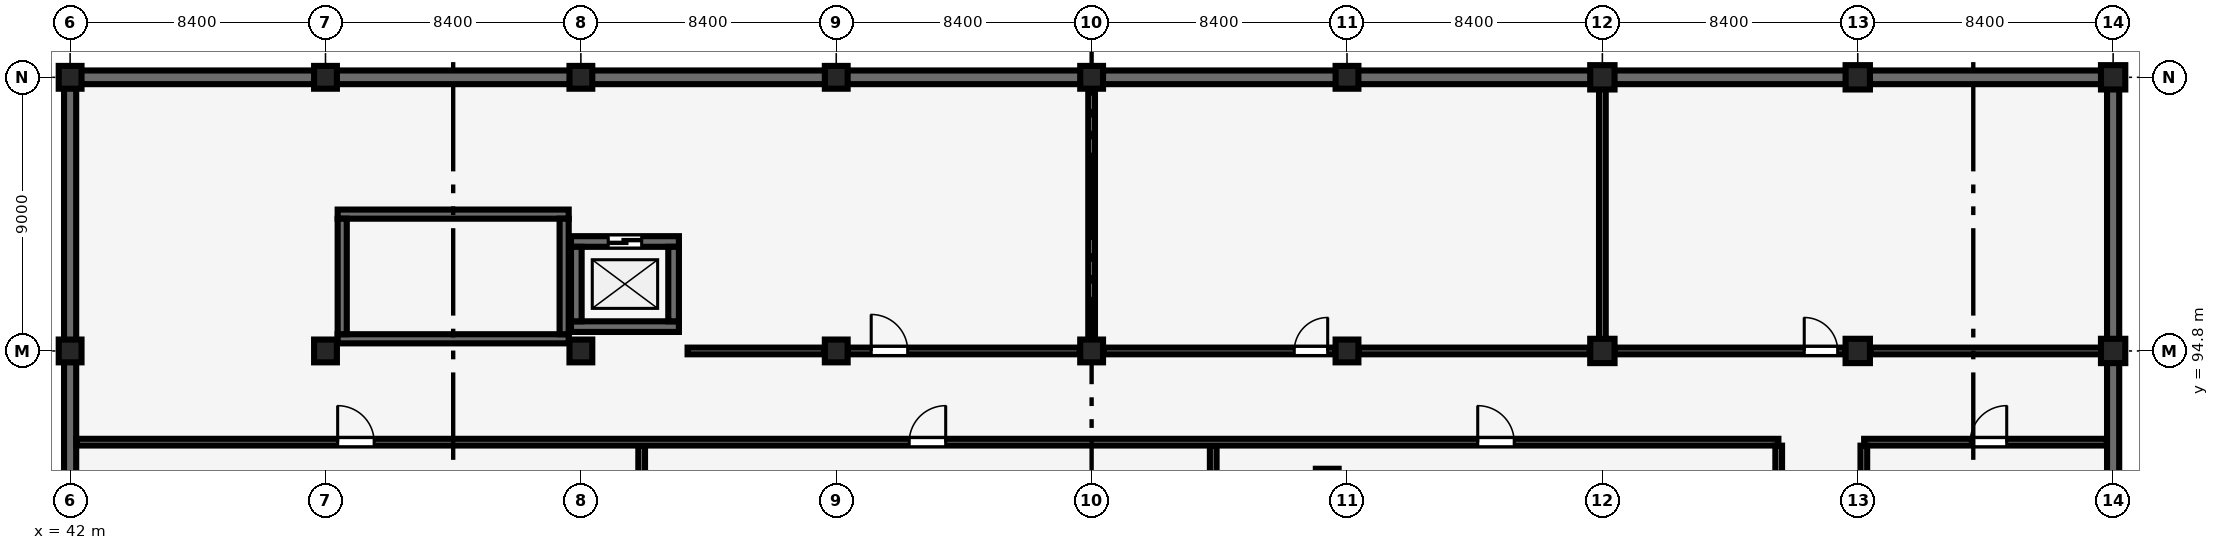
"""IFC4 building model, lengths in metres.
Left out: names, types, materials, properties, quantities, classifications, styles, units other than length and angle.
Written with IfcOpenShell. Run it as: python <this file> out.ifc"""

import sys

from ifc_helpers import new_model, si_unit, direction, frame, frame_2d, origin, origin_2d, place, context, subcontext, project, spatial, rectangle, extrude, element, fill, save


model = new_model("IFC4")
c1 = context("Model", 3, precision=1e-05, world=origin(), true_north=direction((0.0, 1.0)))
c2 = subcontext(c1, "Body", "Model", "MODEL_VIEW")
j1 = project(units=[si_unit("LENGTHUNIT", "METRE"), si_unit("PLANEANGLEUNIT", "RADIAN")], contexts=[c1])
p1 = place(None, origin())
s1 = spatial("IfcSite", under=j1, at=p1, CompositionType="ELEMENT")
p2 = place(p1, origin())
s2 = spatial("IfcBuilding", under=s1, at=p2, CompositionType="ELEMENT")
p3 = place(p2, frame((0.0, 0.0, -4.2)))
s3 = spatial("IfcBuildingStorey", under=s2, at=p3, CompositionType="ELEMENT", Elevation=-4.2)
for number, where, z_axis, x_axis in (
    (1, (42.0, 94.8, 0.0), (0.0, 0.0, 1.0), (1.0, 0.0, 0.0)),
    (2, (42.0, 103.8, 0.0), (0.0, 0.0, 1.0), (1.0, 0.0, 0.0)),
    (3, (50.4, 94.8, 0.0), (0.0, 0.0, 1.0), (1.0, 0.0, 0.0)),
    (4, (50.4, 103.8, 0.0), (0.0, 0.0, 1.0), (1.0, 0.0, 0.0)),
    (5, (58.8, 94.8, 0.0), (0.0, 0.0, 1.0), (1.0, 0.0, 0.0)),
    (6, (58.8, 103.8, 0.0), (0.0, 0.0, 1.0), (1.0, 0.0, 0.0)),
    (7, (67.2, 94.8, 0.0), (0.0, 0.0, 1.0), (1.0, 0.0, 0.0)),
    (8, (67.2, 103.8, 0.0), (0.0, 0.0, 1.0), (1.0, 0.0, 0.0)),
    (9, (75.6, 94.8, 0.0), (0.0, 0.0, 1.0), (1.0, 0.0, 0.0)),
    (10, (75.6, 103.8, 0.0), (0.0, 0.0, 1.0), (1.0, 0.0, 0.0)),
    (11, (84.0, 94.8, 0.0), (0.0, 0.0, 1.0), (1.0, 0.0, 0.0)),
    (12, (84.0, 103.8, 0.0), (0.0, 0.0, 1.0), (1.0, 0.0, 0.0)),
):
    element("IfcColumn", number, at=place(p3, frame(where, z_axis=z_axis, x_axis=x_axis)), inside=s3, PredefinedType="COLUMN", context=c2, shape_type="SweptSolid", body=[
        extrude(rectangle(XDim=0.75, YDim=0.75, at=origin_2d()), origin(), (0.0, 0.0, 1.0), 4.2),
    ])
for number, where, z_axis, x_axis in (
    (13, (92.4, 94.8, 0.0), (0.0, 0.0, 1.0), (1.0, 0.0, 0.0)),
    (14, (92.4, 103.8, 0.0), (0.0, 0.0, 1.0), (1.0, 0.0, 0.0)),
    (15, (100.8, 94.8, 0.0), (0.0, 0.0, 1.0), (1.0, 0.0, 0.0)),
    (16, (100.8, 103.8, 0.0), (0.0, 0.0, 1.0), (1.0, 0.0, 0.0)),
    (17, (109.2, 94.8, 0.0), (0.0, 0.0, 1.0), (1.0, 0.0, 0.0)),
    (18, (109.2, 103.8, 0.0), (0.0, 0.0, 1.0), (1.0, 0.0, 0.0)),
):
    element("IfcColumn", number, at=place(p3, frame(where, z_axis=z_axis, x_axis=x_axis)), inside=s3, PredefinedType="COLUMN", context=c2, shape_type="SweptSolid", body=[
        extrude(rectangle(XDim=0.8, YDim=0.8, at=origin_2d()), origin(), (0.0, 0.0, 1.0), 4.2),
    ])
p4 = place(p3, frame((109.2, 86.175, 0.0), z_axis=(0.0, 0.0, 1.0), x_axis=(0.0, 1.0, 0.0)))
e19 = element("IfcWall", 19, at=p4, inside=s3, PredefinedType="SHEAR", context=c2, shape_type="SweptSolid", body=[
    extrude(rectangle(XDim=8.25, YDim=0.4, at=frame_2d((4.125, 0.0))), origin(), (0.0, 0.0, 1.0), 2.9),
])
p5 = place(p3, frame((109.2, 95.175, 0.0), z_axis=(0.0, 0.0, 1.0), x_axis=(0.0, 1.0, 0.0)))
e20 = element("IfcWall", 20, at=p5, inside=s3, PredefinedType="SHEAR", context=c2, shape_type="SweptSolid", body=[
    extrude(rectangle(XDim=8.25, YDim=0.4, at=frame_2d((4.125, 0.0))), origin(), (0.0, 0.0, 1.0), 2.85),
])
p6 = place(p3, frame((42.35, 103.8, 0.0), z_axis=(0.0, 0.0, 1.0), x_axis=(1.0, 0.0, 0.0)))
e21 = element("IfcWall", 21, at=p6, inside=s3, PredefinedType="SHEAR", context=c2, shape_type="SweptSolid", body=[
    extrude(rectangle(XDim=7.7, YDim=0.45, at=frame_2d((3.85, 0.0))), origin(), (0.0, 0.0, 1.0), 3.2),
])
p7 = place(p3, frame((50.75, 103.8, 0.0), z_axis=(0.0, 0.0, 1.0), x_axis=(1.0, 0.0, 0.0)))
e22 = element("IfcWall", 22, at=p7, inside=s3, PredefinedType="SHEAR", context=c2, shape_type="SweptSolid", body=[
    extrude(rectangle(XDim=7.7, YDim=0.45, at=frame_2d((3.85, 0.0))), origin(), (0.0, 0.0, 1.0), 3.15),
])
p8 = place(p3, frame((59.15, 103.8, 0.0), z_axis=(0.0, 0.0, 1.0), x_axis=(1.0, 0.0, 0.0)))
e23 = element("IfcWall", 23, at=p8, inside=s3, PredefinedType="SHEAR", context=c2, shape_type="SweptSolid", body=[
    extrude(rectangle(XDim=7.7, YDim=0.45, at=frame_2d((3.85, 0.0))), origin(), (0.0, 0.0, 1.0), 3.2),
])
p9 = place(p3, frame((67.55, 103.8, 0.0), z_axis=(0.0, 0.0, 1.0), x_axis=(1.0, 0.0, 0.0)))
e24 = element("IfcWall", 24, at=p9, inside=s3, PredefinedType="SHEAR", context=c2, shape_type="SweptSolid", body=[
    extrude(rectangle(XDim=7.7, YDim=0.45, at=frame_2d((3.85, 0.0))), origin(), (0.0, 0.0, 1.0), 3.15),
])
p10 = place(p3, frame((75.95, 103.8, 0.0), z_axis=(0.0, 0.0, 1.0), x_axis=(1.0, 0.0, 0.0)))
e25 = element("IfcWall", 25, at=p10, inside=s3, PredefinedType="SHEAR", context=c2, shape_type="SweptSolid", body=[
    extrude(rectangle(XDim=7.7, YDim=0.45, at=frame_2d((3.85, 0.0))), origin(), (0.0, 0.0, 1.0), 3.1),
])
p11 = place(p3, frame((84.35, 103.8, 0.0), z_axis=(0.0, 0.0, 1.0), x_axis=(1.0, 0.0, 0.0)))
e26 = element("IfcWall", 26, at=p11, inside=s3, PredefinedType="SHEAR", context=c2, shape_type="SweptSolid", body=[
    extrude(rectangle(XDim=7.675, YDim=0.45, at=frame_2d((3.837, 0.0))), origin(), (0.0, 0.0, 1.0), 3.05),
])
p12 = place(p3, frame((92.775, 103.8, 0.0), z_axis=(0.0, 0.0, 1.0), x_axis=(1.0, 0.0, 0.0)))
e27 = element("IfcWall", 27, at=p12, inside=s3, PredefinedType="SHEAR", context=c2, shape_type="SweptSolid", body=[
    extrude(rectangle(XDim=7.65, YDim=0.45, at=frame_2d((3.825, 0.0))), origin(), (0.0, 0.0, 1.0), 3.1),
])
p13 = place(p3, frame((101.175, 103.8, 0.0), z_axis=(0.0, 0.0, 1.0), x_axis=(1.0, 0.0, 0.0)))
e28 = element("IfcWall", 28, at=p13, inside=s3, PredefinedType="SHEAR", context=c2, shape_type="SweptSolid", body=[
    extrude(rectangle(XDim=7.65, YDim=0.45, at=frame_2d((3.825, 0.0))), origin(), (0.0, 0.0, 1.0), 3.05),
])
p14 = place(p3, frame((42.0, 86.15, 0.0), z_axis=(0.0, 0.0, 1.0), x_axis=(0.0, 1.0, 0.0)))
e29 = element("IfcWall", 29, at=p14, inside=s3, PredefinedType="SHEAR", context=c2, shape_type="SweptSolid", body=[
    extrude(rectangle(XDim=8.3, YDim=0.4, at=frame_2d((4.15, 0.0))), origin(), (0.0, 0.0, 1.0), 3.0),
])
p15 = place(p3, frame((42.0, 95.15, 0.0), z_axis=(0.0, 0.0, 1.0), x_axis=(0.0, 1.0, 0.0)))
e30 = element("IfcWall", 30, at=p15, inside=s3, PredefinedType="SHEAR", context=c2, shape_type="SweptSolid", body=[
    extrude(rectangle(XDim=8.3, YDim=0.4, at=frame_2d((4.15, 0.0))), origin(), (0.0, 0.0, 1.0), 2.95),
])
for number, where, z_axis, x_axis in (
    (31, (50.8, 95.2, 0.0), (0.0, 0.0, 1.0), (1.0, 0.0, 0.0)),
    (32, (50.8, 99.3, 0.0), (0.0, 0.0, 1.0), (1.0, 0.0, 0.0)),
):
    element("IfcWall", number, at=place(p3, frame(where, z_axis=z_axis, x_axis=x_axis)), inside=s3, PredefinedType="SHEAR", context=c2, shape_type="SweptSolid", body=[
        extrude(rectangle(XDim=7.6, YDim=0.3, at=frame_2d((3.8, 0.0))), origin(), (0.0, 0.0, 1.0), 4.025),
    ])
for number, where, z_axis, x_axis in (
    (33, (50.95, 95.35, 0.0), (0.0, 0.0, 1.0), (0.0, 1.0, 0.0)),
    (34, (58.25, 95.35, 0.0), (0.0, 0.0, 1.0), (0.0, 1.0, 0.0)),
):
    element("IfcWall", number, at=place(p3, frame(where, z_axis=z_axis, x_axis=x_axis)), inside=s3, PredefinedType="SHEAR", context=c2, shape_type="SweptSolid", body=[
        extrude(rectangle(XDim=3.8, YDim=0.3, at=frame_2d((1.9, 0.0))), origin(), (0.0, 0.0, 1.0), 4.025),
    ])
p16 = place(p3, frame((58.475, 95.6, 0.0), z_axis=(0.0, 0.0, 1.0), x_axis=(1.0, 0.0, 0.0)))
e35 = element("IfcWall", 35, at=p16, inside=s3, PredefinedType="SHEAR", context=c2, shape_type="SweptSolid", body=[
    extrude(rectangle(XDim=3.55, YDim=0.35, at=frame_2d((1.775, 0.0))), origin(), (0.0, 0.0, 1.0), 3.92),
])
p17 = place(p3, frame((58.475, 98.4, 0.0), z_axis=(0.0, 0.0, 1.0), x_axis=(1.0, 0.0, 0.0)))
e36 = element("IfcWall", 36, at=p17, inside=s3, PredefinedType="SHEAR", context=c2, shape_type="SweptSolid", body=[
    extrude(rectangle(XDim=3.55, YDim=0.35, at=frame_2d((1.775, 0.0))), origin(), (0.0, 0.0, 1.0), 3.92),
])
p18 = place(p17, frame((1.225, 0.0, 0.0)))
e37 = element("IfcOpeningElement", 37, at=p18, cuts=e36, PredefinedType="OPENING", context=c2, shape_type="SweptSolid", body=[
    extrude(rectangle(XDim=1.1, YDim=2.2, at=frame_2d((0.55, 1.1))), frame((0.0, 0.185, 0.0), z_axis=(0.0, -1.0, 0.0), x_axis=(1.0, 0.0, 0.0)), (0.0, 0.0, 1.0), 0.37),
])
for number, where, z_axis, x_axis in (
    (38, (58.65, 95.775, 0.0), (0.0, 0.0, 1.0), (0.0, 1.0, 0.0)),
    (39, (61.85, 95.775, 0.0), (0.0, 0.0, 1.0), (0.0, 1.0, 0.0)),
):
    element("IfcWall", number, at=place(p3, frame(where, z_axis=z_axis, x_axis=x_axis)), inside=s3, PredefinedType="SHEAR", context=c2, shape_type="SweptSolid", body=[
        extrude(rectangle(XDim=2.45, YDim=0.35, at=frame_2d((1.225, 0.0))), origin(), (0.0, 0.0, 1.0), 3.92),
    ])
p19 = place(p3, frame((83.35, 90.55, 0.0), z_axis=(0.0, 0.0, 1.0), x_axis=(1.0, 0.0, 0.0)))
e40 = element("IfcColumn", 40, at=p19, inside=s3, PredefinedType="COLUMN", context=c2, shape_type="SweptSolid", body=[
    extrude(rectangle(XDim=0.75, YDim=0.75, at=origin_2d()), origin(), (0.0, 0.0, 1.0), 4.2),
])
for number, where, z_axis, x_axis in (
    (41, (60.8, 86.03, 0.0), (0.0, 0.0, 1.0), (0.0, 1.0, 0.0)),
    (42, (79.6, 86.03, 0.0), (0.0, 0.0, 1.0), (0.0, 1.0, 0.0)),
):
    element("IfcWall", number, at=place(p3, frame(where, z_axis=z_axis, x_axis=x_axis)), inside=s3, PredefinedType="SOLIDWALL", context=c2, shape_type="SweptSolid", body=[
        extrude(rectangle(XDim=5.655, YDim=0.22, at=frame_2d((2.828, 0.0))), origin(), (0.0, 0.0, 1.0), 3.9),
    ])
p20 = place(p3, frame((42.205, 91.8, 0.0), z_axis=(0.0, 0.0, 1.0), x_axis=(1.0, 0.0, 0.0)))
e43 = element("IfcWall", 43, at=p20, inside=s3, PredefinedType="SOLIDWALL", context=c2, shape_type="SweptSolid", body=[
    extrude(rectangle(XDim=55.985, YDim=0.22, at=frame_2d((27.992, 0.0))), origin(), (0.0, 0.0, 1.0), 3.9),
])
p21 = place(p20, frame((8.595, 0.0, 0.0)))
e44 = element("IfcOpeningElement", 44, at=p21, cuts=e43, PredefinedType="OPENING", context=c2, shape_type="SweptSolid", body=[
    extrude(rectangle(XDim=1.2, YDim=2.4, at=frame_2d((0.6, 1.2))), frame((0.0, 0.12, 0.0), z_axis=(0.0, -1.0, 0.0), x_axis=(1.0, 0.0, 0.0)), (0.0, 0.0, 1.0), 0.24),
])
p22 = place(p20, frame((27.395, 0.0, 0.0)))
e45 = element("IfcOpeningElement", 45, at=p22, cuts=e43, PredefinedType="OPENING", context=c2, shape_type="SweptSolid", body=[
    extrude(rectangle(XDim=1.2, YDim=2.4, at=frame_2d((0.6, 1.2))), frame((0.0, 0.12, 0.0), z_axis=(0.0, -1.0, 0.0), x_axis=(1.0, 0.0, 0.0)), (0.0, 0.0, 1.0), 0.24),
])
p23 = place(p20, frame((46.095, 0.0, 0.0)))
e46 = element("IfcOpeningElement", 46, at=p23, cuts=e43, PredefinedType="OPENING", context=c2, shape_type="SweptSolid", body=[
    extrude(rectangle(XDim=1.2, YDim=2.4, at=frame_2d((0.6, 1.2))), frame((0.0, 0.12, 0.0), z_axis=(0.0, -1.0, 0.0), x_axis=(1.0, 0.0, 0.0)), (0.0, 0.0, 1.0), 0.24),
])
p24 = place(p3, frame((98.2, 85.81, 0.0), z_axis=(0.0, 0.0, 1.0), x_axis=(0.0, 1.0, 0.0)))
e47 = element("IfcWall", 47, at=p24, inside=s3, PredefinedType="SOLIDWALL", context=c2, shape_type="SweptSolid", body=[
    extrude(rectangle(XDim=5.875, YDim=0.22, at=frame_2d((2.938, 0.0))), origin(), (0.0, 0.0, 1.0), 3.9),
])
p25 = place(p3, frame((101.01, 91.8, 0.0), z_axis=(0.0, 0.0, 1.0), x_axis=(1.0, 0.0, 0.0)))
e48 = element("IfcWall", 48, at=p25, inside=s3, PredefinedType="SOLIDWALL", context=c2, shape_type="SweptSolid", body=[
    extrude(rectangle(XDim=7.985, YDim=0.22, at=frame_2d((3.993, 0.0))), origin(), (0.0, 0.0, 1.0), 3.9),
])
p26 = place(p25, frame((3.49, 0.0, 0.0)))
e49 = element("IfcOpeningElement", 49, at=p26, cuts=e48, PredefinedType="OPENING", context=c2, shape_type="SweptSolid", body=[
    extrude(rectangle(XDim=1.2, YDim=2.4, at=frame_2d((0.6, 1.2))), frame((0.0, 0.12, 0.0), z_axis=(0.0, -1.0, 0.0), x_axis=(1.0, 0.0, 0.0)), (0.0, 0.0, 1.0), 0.24),
])
p27 = place(p3, frame((101.0, 86.21, 0.0), z_axis=(0.0, 0.0, 1.0), x_axis=(0.0, 1.0, 0.0)))
e50 = element("IfcWall", 50, at=p27, inside=s3, PredefinedType="SOLIDWALL", context=c2, shape_type="SweptSolid", body=[
    extrude(rectangle(XDim=5.475, YDim=0.22, at=frame_2d((2.738, 0.0))), origin(), (0.0, 0.0, 1.0), 3.25),
])
p28 = place(p3, frame((75.6, 94.915, 0.0), z_axis=(0.0, 0.0, 1.0), x_axis=(0.0, 1.0, 0.0)))
e51 = element("IfcWall", 51, at=p28, inside=s3, PredefinedType="SOLIDWALL", context=c2, shape_type="SweptSolid", body=[
    extrude(rectangle(XDim=8.655, YDim=0.22, at=frame_2d((4.328, 0.0))), origin(), (0.0, 0.0, 1.0), 2.9),
])
p29 = place(p3, frame((92.4, 94.915, 0.0), z_axis=(0.0, 0.0, 1.0), x_axis=(0.0, 1.0, 0.0)))
e52 = element("IfcWall", 52, at=p29, inside=s3, PredefinedType="SOLIDWALL", context=c2, shape_type="SweptSolid", body=[
    extrude(rectangle(XDim=8.655, YDim=0.22, at=frame_2d((4.328, 0.0))), origin(), (0.0, 0.0, 1.0), 3.05),
])
p30 = place(p3, frame((62.31, 94.8, 0.0), z_axis=(0.0, 0.0, 1.0), x_axis=(1.0, 0.0, 0.0)))
e53 = element("IfcWall", 53, at=p30, inside=s3, PredefinedType="SOLIDWALL", context=c2, shape_type="SweptSolid", body=[
    extrude(rectangle(XDim=4.505, YDim=0.22, at=frame_2d((2.252, 0.0))), origin(), (0.0, 0.0, 1.0), 2.9),
])
p31 = place(p3, frame((67.585, 94.8, 0.0), z_axis=(0.0, 0.0, 1.0), x_axis=(1.0, 0.0, 0.0)))
e54 = element("IfcWall", 54, at=p31, inside=s3, PredefinedType="SOLIDWALL", context=c2, shape_type="SweptSolid", body=[
    extrude(rectangle(XDim=7.63, YDim=0.22, at=frame_2d((3.815, 0.0))), origin(), (0.0, 0.0, 1.0), 2.9),
])
p32 = place(p31, frame((0.765, 0.0, 0.0)))
e55 = element("IfcOpeningElement", 55, at=p32, cuts=e54, PredefinedType="OPENING", context=c2, shape_type="SweptSolid", body=[
    extrude(rectangle(XDim=1.2, YDim=2.4, at=frame_2d((0.6, 1.2))), frame((0.0, 0.12, 0.0), z_axis=(0.0, -1.0, 0.0), x_axis=(1.0, 0.0, 0.0)), (0.0, 0.0, 1.0), 0.24),
])
p33 = place(p3, frame((75.985, 94.8, 0.0), z_axis=(0.0, 0.0, 1.0), x_axis=(1.0, 0.0, 0.0)))
e56 = element("IfcWall", 56, at=p33, inside=s3, PredefinedType="SOLIDWALL", context=c2, shape_type="SweptSolid", body=[
    extrude(rectangle(XDim=7.63, YDim=0.22, at=frame_2d((3.815, 0.0))), origin(), (0.0, 0.0, 1.0), 2.85),
])
p34 = place(p33, frame((6.28, 0.0, 0.0)))
e57 = element("IfcOpeningElement", 57, at=p34, cuts=e56, PredefinedType="OPENING", context=c2, shape_type="SweptSolid", body=[
    extrude(rectangle(XDim=1.1, YDim=2.15, at=frame_2d((0.55, 1.075))), frame((0.0, 0.12, 0.0), z_axis=(0.0, -1.0, 0.0), x_axis=(1.0, 0.0, 0.0)), (0.0, 0.0, 1.0), 0.24),
])
p35 = place(p3, frame((84.385, 94.8, 0.0), z_axis=(0.0, 0.0, 1.0), x_axis=(1.0, 0.0, 0.0)))
e58 = element("IfcWall", 58, at=p35, inside=s3, PredefinedType="SOLIDWALL", context=c2, shape_type="SweptSolid", body=[
    extrude(rectangle(XDim=7.605, YDim=0.22, at=frame_2d((3.802, 0.0))), origin(), (0.0, 0.0, 1.0), 2.8),
])
p36 = place(p3, frame((92.81, 94.8, 0.0), z_axis=(0.0, 0.0, 1.0), x_axis=(1.0, 0.0, 0.0)))
e59 = element("IfcWall", 59, at=p36, inside=s3, PredefinedType="SOLIDWALL", context=c2, shape_type="SweptSolid", body=[
    extrude(rectangle(XDim=7.58, YDim=0.22, at=frame_2d((3.79, 0.0))), origin(), (0.0, 0.0, 1.0), 2.7),
])
p37 = place(p36, frame((6.23, 0.0, 0.0)))
e60 = element("IfcOpeningElement", 60, at=p37, cuts=e59, PredefinedType="OPENING", context=c2, shape_type="SweptSolid", body=[
    extrude(rectangle(XDim=1.1, YDim=2.15, at=frame_2d((0.55, 1.075))), frame((0.0, 0.12, 0.0), z_axis=(0.0, -1.0, 0.0), x_axis=(1.0, 0.0, 0.0)), (0.0, 0.0, 1.0), 0.24),
])
p38 = place(p3, frame((101.21, 94.8, 0.0), z_axis=(0.0, 0.0, 1.0), x_axis=(1.0, 0.0, 0.0)))
e61 = element("IfcWall", 61, at=p38, inside=s3, PredefinedType="SOLIDWALL", context=c2, shape_type="SweptSolid", body=[
    extrude(rectangle(XDim=7.785, YDim=0.22, at=frame_2d((3.893, 0.0))), origin(), (0.0, 0.0, 1.0), 3.25),
])
p39 = place(p18, origin())
e62 = element("IfcDoor", 62, at=p39, inside=s3, OperationType="DOUBLE_DOOR_SLIDING", PredefinedType="DOOR", context=c2, shape_type="SweptSolid", body=[
    extrude(rectangle(XDim=1.1, YDim=2.2, at=frame_2d((0.55, 1.1))), frame((0.0, 0.025, 0.0), z_axis=(0.0, -1.0, 0.0), x_axis=(1.0, 0.0, 0.0)), (0.0, 0.0, 1.0), 0.05),
])
fill(e37, e62)
p40 = place(p21, origin())
e63 = element("IfcDoor", 63, at=p40, inside=s3, OperationType="SINGLE_SWING_LEFT", PredefinedType="DOOR", context=c2, shape_type="SweptSolid", body=[
    extrude(rectangle(XDim=1.2, YDim=2.4, at=frame_2d((0.6, 1.2))), frame((0.0, 0.025, 0.0), z_axis=(0.0, -1.0, 0.0), x_axis=(1.0, 0.0, 0.0)), (0.0, 0.0, 1.0), 0.05),
])
fill(e44, e63)
p41 = place(p22, origin())
e64 = element("IfcDoor", 64, at=p41, inside=s3, OperationType="SINGLE_SWING_RIGHT", PredefinedType="DOOR", context=c2, shape_type="SweptSolid", body=[
    extrude(rectangle(XDim=1.2, YDim=2.4, at=frame_2d((0.6, 1.2))), frame((0.0, 0.025, 0.0), z_axis=(0.0, -1.0, 0.0), x_axis=(1.0, 0.0, 0.0)), (0.0, 0.0, 1.0), 0.05),
])
fill(e45, e64)
p42 = place(p23, origin())
e65 = element("IfcDoor", 65, at=p42, inside=s3, OperationType="SINGLE_SWING_LEFT", PredefinedType="DOOR", context=c2, shape_type="SweptSolid", body=[
    extrude(rectangle(XDim=1.2, YDim=2.4, at=frame_2d((0.6, 1.2))), frame((0.0, 0.025, 0.0), z_axis=(0.0, -1.0, 0.0), x_axis=(1.0, 0.0, 0.0)), (0.0, 0.0, 1.0), 0.05),
])
fill(e46, e65)
p43 = place(p26, origin())
e66 = element("IfcDoor", 66, at=p43, inside=s3, OperationType="SINGLE_SWING_RIGHT", PredefinedType="DOOR", context=c2, shape_type="SweptSolid", body=[
    extrude(rectangle(XDim=1.2, YDim=2.4, at=frame_2d((0.6, 1.2))), frame((0.0, 0.025, 0.0), z_axis=(0.0, -1.0, 0.0), x_axis=(1.0, 0.0, 0.0)), (0.0, 0.0, 1.0), 0.05),
])
fill(e49, e66)
p44 = place(p32, origin())
e67 = element("IfcDoor", 67, at=p44, inside=s3, OperationType="SINGLE_SWING_LEFT", PredefinedType="DOOR", context=c2, shape_type="SweptSolid", body=[
    extrude(rectangle(XDim=1.2, YDim=2.4, at=frame_2d((0.6, 1.2))), frame((0.0, 0.025, 0.0), z_axis=(0.0, -1.0, 0.0), x_axis=(1.0, 0.0, 0.0)), (0.0, 0.0, 1.0), 0.05),
])
fill(e55, e67)
p45 = place(p34, origin())
e68 = element("IfcDoor", 68, at=p45, inside=s3, OperationType="SINGLE_SWING_RIGHT", PredefinedType="DOOR", context=c2, shape_type="SweptSolid", body=[
    extrude(rectangle(XDim=1.1, YDim=2.15, at=frame_2d((0.55, 1.075))), frame((0.0, 0.025, 0.0), z_axis=(0.0, -1.0, 0.0), x_axis=(1.0, 0.0, 0.0)), (0.0, 0.0, 1.0), 0.05),
])
fill(e57, e68)
p46 = place(p37, origin())
e69 = element("IfcDoor", 69, at=p46, inside=s3, OperationType="SINGLE_SWING_LEFT", PredefinedType="DOOR", context=c2, shape_type="SweptSolid", body=[
    extrude(rectangle(XDim=1.1, YDim=2.15, at=frame_2d((0.55, 1.075))), frame((0.0, 0.025, 0.0), z_axis=(0.0, -1.0, 0.0), x_axis=(1.0, 0.0, 0.0)), (0.0, 0.0, 1.0), 0.05),
])
fill(e60, e69)
save(model, sys.argv[1])
